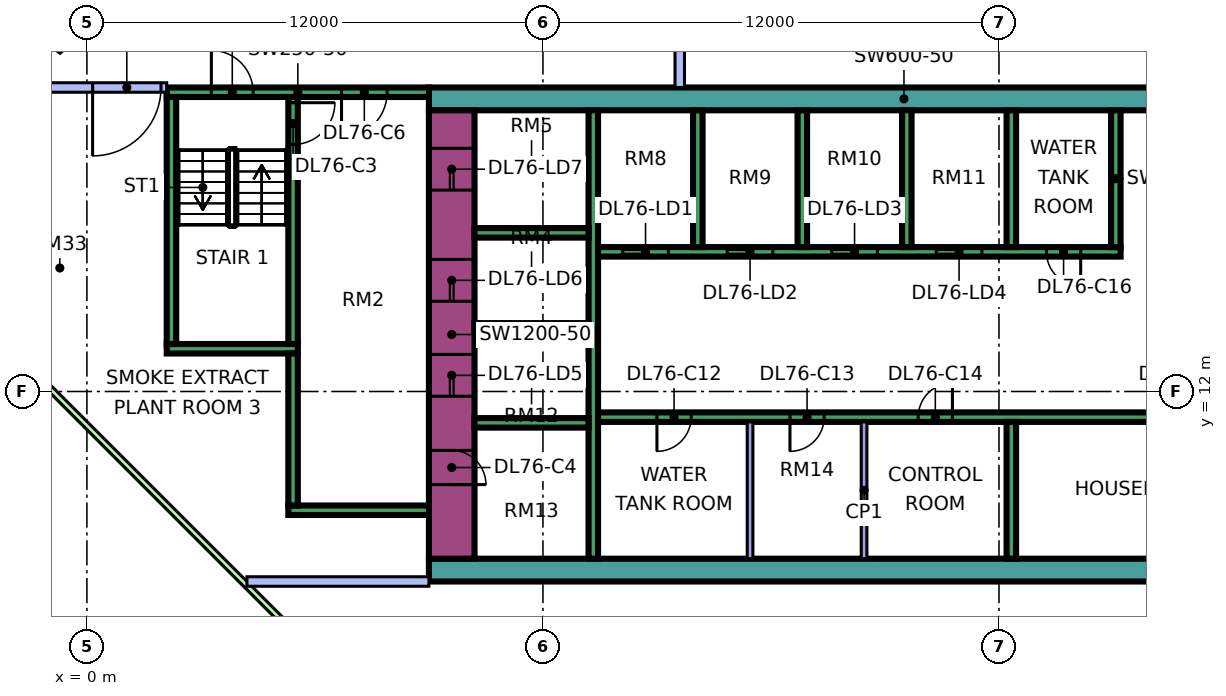
"""IFC4 building model, lengths in metres.
Left out: names, types, materials, properties, quantities, classifications, styles, units other than length and angle.
Written with IfcOpenShell. Run it as: python <this file> out.ifc"""

import sys

from ifc_helpers import new_model, si_unit, direction, frame, frame_2d, origin, place, context, subcontext, project, spatial, rectangle, extrude, element, fill, save


model = new_model("IFC4")
c1 = context("Model", 3, precision=1e-05, world=origin(), true_north=direction((0.0, 1.0)))
c2 = subcontext(c1, "Body", "Model", "MODEL_VIEW")
j1 = project(units=[si_unit("LENGTHUNIT", "METRE"), si_unit("PLANEANGLEUNIT", "RADIAN")], contexts=[c1])
p1 = place(None, origin())
s1 = spatial("IfcSite", under=j1, at=p1, CompositionType="ELEMENT")
p2 = place(p1, origin())
s2 = spatial("IfcBuilding", under=s1, at=p2, CompositionType="ELEMENT")
p3 = place(p2, frame((0.0, 0.0, 322.15)))
s3 = spatial("IfcBuildingStorey", under=s2, at=p3, CompositionType="ELEMENT", Elevation=322.15)
p4 = place(p3, frame((9.0, 7.3, 0.0), z_axis=(0.0, 0.0, 1.0), x_axis=(1.0, 0.0, 0.0)))
e1 = element("IfcWall", 1, at=p4, inside=s3, PredefinedType="SHEAR", context=c2, shape_type="SweptSolid", body=[
    extrude(rectangle(XDim=25.0, YDim=0.6, at=frame_2d((12.5, 0.0))), origin(), (0.0, 0.0, 1.0), 5.5),
])
p5 = place(p3, frame((9.0, 19.7, 0.0), z_axis=(0.0, 0.0, 1.0), x_axis=(1.0, 0.0, 0.0)))
e2 = element("IfcWall", 2, at=p5, inside=s3, PredefinedType="SHEAR", context=c2, shape_type="SweptSolid", body=[
    extrude(rectangle(XDim=25.0, YDim=0.6, at=frame_2d((12.5, 0.0))), origin(), (0.0, 0.0, 1.0), 5.5),
])
p6 = place(p5, frame((19.1, 0.0, 0.0)))
e3 = element("IfcOpeningElement", 3, at=p6, cuts=e2, PredefinedType="OPENING", context=c2, shape_type="SweptSolid", body=[
    extrude(rectangle(XDim=1.8, YDim=2.4, at=frame_2d((0.9, 1.2))), frame((0.0, 0.31, 0.0), z_axis=(0.0, -1.0, 0.0), x_axis=(1.0, 0.0, 0.0)), (0.0, 0.0, 1.0), 0.62),
])
p7 = place(p3, frame((9.6, 7.6, 0.0), z_axis=(0.0, 0.0, 1.0), x_axis=(0.0, 1.0, 0.0)))
e4 = element("IfcWall", 4, at=p7, inside=s3, PredefinedType="SHEAR", context=c2, shape_type="SweptSolid", body=[
    extrude(rectangle(XDim=11.8, YDim=1.2, at=frame_2d((5.9, 0.0))), origin(), (0.0, 0.0, 1.0), 5.5),
])
p8 = place(p7, frame((4.275, 0.0, 0.0)))
e5 = element("IfcOpeningElement", 5, at=p8, cuts=e4, PredefinedType="OPENING", context=c2, shape_type="SweptSolid", body=[
    extrude(rectangle(XDim=1.1, YDim=2.2, at=frame_2d((0.55, 1.1))), frame((0.0, 0.61, 0.0), z_axis=(0.0, -1.0, 0.0), x_axis=(1.0, 0.0, 0.0)), (0.0, 0.0, 1.0), 1.22),
])
p9 = place(p7, frame((6.775, 0.0, 0.0)))
e6 = element("IfcOpeningElement", 6, at=p9, cuts=e4, PredefinedType="OPENING", context=c2, shape_type="SweptSolid", body=[
    extrude(rectangle(XDim=1.1, YDim=2.2, at=frame_2d((0.55, 1.1))), frame((0.0, 0.61, 0.0), z_axis=(0.0, -1.0, 0.0), x_axis=(1.0, 0.0, 0.0)), (0.0, 0.0, 1.0), 1.22),
])
p10 = place(p7, frame((9.7, 0.0, 0.0)))
e7 = element("IfcOpeningElement", 7, at=p10, cuts=e4, PredefinedType="OPENING", context=c2, shape_type="SweptSolid", body=[
    extrude(rectangle(XDim=1.1, YDim=2.2, at=frame_2d((0.55, 1.1))), frame((0.0, 0.61, 0.0), z_axis=(0.0, -1.0, 0.0), x_axis=(1.0, 0.0, 0.0)), (0.0, 0.0, 1.0), 1.22),
])
p11 = place(p7, frame((1.95, 0.0, 0.0)))
e8 = element("IfcOpeningElement", 8, at=p11, cuts=e4, PredefinedType="OPENING", context=c2, shape_type="SweptSolid", body=[
    extrude(rectangle(XDim=0.9, YDim=2.1, at=frame_2d((0.45, 1.05))), frame((0.0, 0.61, 0.0), z_axis=(0.0, -1.0, 0.0), x_axis=(1.0, 0.0, 0.0)), (0.0, 0.0, 1.0), 1.22),
])
p12 = place(p3, frame((13.325, 7.6, 0.0), z_axis=(0.0, 0.0, 1.0), x_axis=(0.0, 1.0, 0.0)))
e9 = element("IfcWall", 9, at=p12, inside=s3, PredefinedType="SHEAR", context=c2, shape_type="SweptSolid", body=[
    extrude(rectangle(XDim=11.8, YDim=0.25, at=frame_2d((5.9, 0.0))), origin(), (0.0, 0.0, 1.0), 5.5),
])
p13 = place(p3, frame((13.45, 11.325, 0.0), z_axis=(0.0, 0.0, 1.0), x_axis=(1.0, 0.0, 0.0)))
e10 = element("IfcWall", 10, at=p13, inside=s3, PredefinedType="SHEAR", context=c2, shape_type="SweptSolid", body=[
    extrude(rectangle(XDim=19.95, YDim=0.25, at=frame_2d((9.975, 0.0))), origin(), (0.0, 0.0, 1.0), 5.5),
])
p14 = place(p13, frame((1.55, 0.0, 0.0)))
e11 = element("IfcOpeningElement", 11, at=p14, cuts=e10, PredefinedType="OPENING", context=c2, shape_type="SweptSolid", body=[
    extrude(rectangle(XDim=0.9, YDim=2.1, at=frame_2d((0.45, 1.05))), frame((0.0, 0.135, 0.0), z_axis=(0.0, -1.0, 0.0), x_axis=(1.0, 0.0, 0.0)), (0.0, 0.0, 1.0), 0.27),
])
p15 = place(p13, frame((5.05, 0.0, 0.0)))
e12 = element("IfcOpeningElement", 12, at=p15, cuts=e10, PredefinedType="OPENING", context=c2, shape_type="SweptSolid", body=[
    extrude(rectangle(XDim=0.9, YDim=2.1, at=frame_2d((0.45, 1.05))), frame((0.0, 0.135, 0.0), z_axis=(0.0, -1.0, 0.0), x_axis=(1.0, 0.0, 0.0)), (0.0, 0.0, 1.0), 0.27),
])
p16 = place(p13, frame((8.425, 0.0, 0.0)))
e13 = element("IfcOpeningElement", 13, at=p16, cuts=e10, PredefinedType="OPENING", context=c2, shape_type="SweptSolid", body=[
    extrude(rectangle(XDim=0.9, YDim=2.1, at=frame_2d((0.45, 1.05))), frame((0.0, 0.135, 0.0), z_axis=(0.0, -1.0, 0.0), x_axis=(1.0, 0.0, 0.0)), (0.0, 0.0, 1.0), 0.27),
])
p17 = place(p13, frame((15.025, 0.0, 0.0)))
e14 = element("IfcOpeningElement", 14, at=p17, cuts=e10, PredefinedType="OPENING", context=c2, shape_type="SweptSolid", body=[
    extrude(rectangle(XDim=0.9, YDim=2.1, at=frame_2d((0.45, 1.05))), frame((0.0, 0.135, 0.0), z_axis=(0.0, -1.0, 0.0), x_axis=(1.0, 0.0, 0.0)), (0.0, 0.0, 1.0), 0.27),
])
p18 = place(p3, frame((13.45, 15.675, 0.0), z_axis=(0.0, 0.0, 1.0), x_axis=(1.0, 0.0, 0.0)))
e15 = element("IfcWall", 15, at=p18, inside=s3, PredefinedType="SHEAR", context=c2, shape_type="SweptSolid", body=[
    extrude(rectangle(XDim=13.75, YDim=0.25, at=frame_2d((6.875, 0.0))), origin(), (0.0, 0.0, 1.0), 5.5),
])
p19 = place(p18, frame((0.65, 0.0, 0.0)))
e16 = element("IfcOpeningElement", 16, at=p19, cuts=e15, PredefinedType="OPENING", context=c2, shape_type="SweptSolid", body=[
    extrude(rectangle(XDim=1.2, YDim=2.2, at=frame_2d((0.6, 1.1))), frame((0.0, 0.135, 0.0), z_axis=(0.0, -1.0, 0.0), x_axis=(1.0, 0.0, 0.0)), (0.0, 0.0, 1.0), 0.27),
])
p20 = place(p18, frame((3.4, 0.0, 0.0)))
e17 = element("IfcOpeningElement", 17, at=p20, cuts=e15, PredefinedType="OPENING", context=c2, shape_type="SweptSolid", body=[
    extrude(rectangle(XDim=1.2, YDim=2.2, at=frame_2d((0.6, 1.1))), frame((0.0, 0.135, 0.0), z_axis=(0.0, -1.0, 0.0), x_axis=(1.0, 0.0, 0.0)), (0.0, 0.0, 1.0), 0.27),
])
p21 = place(p18, frame((6.15, 0.0, 0.0)))
e18 = element("IfcOpeningElement", 18, at=p21, cuts=e15, PredefinedType="OPENING", context=c2, shape_type="SweptSolid", body=[
    extrude(rectangle(XDim=1.2, YDim=2.2, at=frame_2d((0.6, 1.1))), frame((0.0, 0.135, 0.0), z_axis=(0.0, -1.0, 0.0), x_axis=(1.0, 0.0, 0.0)), (0.0, 0.0, 1.0), 0.27),
])
p22 = place(p18, frame((8.9, 0.0, 0.0)))
e19 = element("IfcOpeningElement", 19, at=p22, cuts=e15, PredefinedType="OPENING", context=c2, shape_type="SweptSolid", body=[
    extrude(rectangle(XDim=1.2, YDim=2.2, at=frame_2d((0.6, 1.1))), frame((0.0, 0.135, 0.0), z_axis=(0.0, -1.0, 0.0), x_axis=(1.0, 0.0, 0.0)), (0.0, 0.0, 1.0), 0.27),
])
p23 = place(p18, frame((11.8, 0.0, 0.0)))
e20 = element("IfcOpeningElement", 20, at=p23, cuts=e15, PredefinedType="OPENING", context=c2, shape_type="SweptSolid", body=[
    extrude(rectangle(XDim=0.9, YDim=2.1, at=frame_2d((0.45, 1.05))), frame((0.0, 0.135, 0.0), z_axis=(0.0, -1.0, 0.0), x_axis=(1.0, 0.0, 0.0)), (0.0, 0.0, 1.0), 0.27),
])
for number, where, z_axis, x_axis in (
    (21, (10.2, 11.175, 0.0), (0.0, 0.0, 1.0), (1.0, 0.0, 0.0)),
    (22, (10.2, 13.675, 0.0), (0.0, 0.0, 1.0), (1.0, 0.0, 0.0)),
    (23, (10.2, 16.175, 0.0), (0.0, 0.0, 1.0), (1.0, 0.0, 0.0)),
):
    element("IfcWall", number, at=place(p3, frame(where, z_axis=z_axis, x_axis=x_axis)), inside=s3, PredefinedType="SHEAR", context=c2, shape_type="SweptSolid", body=[
        extrude(rectangle(XDim=3.0, YDim=0.25, at=frame_2d((1.5, 0.0))), origin(), (0.0, 0.0, 1.0), 5.5),
    ])
for number, where, z_axis, x_axis in (
    (24, (24.325, 7.6, 0.0), (0.0, 0.0, 1.0), (0.0, 1.0, 0.0)),
    (25, (16.075, 15.8, 0.0), (0.0, 0.0, 1.0), (0.0, 1.0, 0.0)),
    (26, (18.825, 15.8, 0.0), (0.0, 0.0, 1.0), (0.0, 1.0, 0.0)),
    (27, (21.575, 15.8, 0.0), (0.0, 0.0, 1.0), (0.0, 1.0, 0.0)),
    (28, (24.325, 15.8, 0.0), (0.0, 0.0, 1.0), (0.0, 1.0, 0.0)),
    (29, (27.075, 15.8, 0.0), (0.0, 0.0, 1.0), (0.0, 1.0, 0.0)),
):
    element("IfcWall", number, at=place(p3, frame(where, z_axis=z_axis, x_axis=x_axis)), inside=s3, PredefinedType="SHEAR", context=c2, shape_type="SweptSolid", body=[
        extrude(rectangle(XDim=3.6, YDim=0.25, at=frame_2d((1.8, 0.0))), origin(), (0.0, 0.0, 1.0), 5.5),
    ])
p24 = place(p3, frame((2.1, 19.875, 0.0), z_axis=(0.0, 0.0, 1.0), x_axis=(1.0, 0.0, 0.0)))
e30 = element("IfcWall", 30, at=p24, inside=s3, PredefinedType="SHEAR", context=c2, shape_type="SweptSolid", body=[
    extrude(rectangle(XDim=6.9, YDim=0.25, at=frame_2d((3.45, 0.0))), origin(), (0.0, 0.0, 1.0), 5.5),
])
p25 = place(p24, frame((1.175, 0.0, 0.0)))
e31 = element("IfcOpeningElement", 31, at=p25, cuts=e30, PredefinedType="OPENING", context=c2, shape_type="SweptSolid", body=[
    extrude(rectangle(XDim=1.1, YDim=2.2, at=frame_2d((0.55, 1.1))), frame((0.0, 0.135, 0.0), z_axis=(0.0, -1.0, 0.0), x_axis=(1.0, 0.0, 0.0)), (0.0, 0.0, 1.0), 0.27),
])
p26 = place(p24, frame((4.6, 0.0, 0.0)))
e32 = element("IfcOpeningElement", 32, at=p26, cuts=e30, PredefinedType="OPENING", context=c2, shape_type="SweptSolid", body=[
    extrude(rectangle(XDim=1.2, YDim=2.2, at=frame_2d((0.6, 1.1))), frame((0.0, 0.135, 0.0), z_axis=(0.0, -1.0, 0.0), x_axis=(1.0, 0.0, 0.0)), (0.0, 0.0, 1.0), 0.27),
])
p27 = place(p3, frame((2.1, 13.125, 0.0), z_axis=(0.0, 0.0, 1.0), x_axis=(1.0, 0.0, 0.0)))
e33 = element("IfcWall", 33, at=p27, inside=s3, PredefinedType="SHEAR", context=c2, shape_type="SweptSolid", body=[
    extrude(rectangle(XDim=3.45, YDim=0.25, at=frame_2d((1.725, 0.0))), origin(), (0.0, 0.0, 1.0), 5.5),
])
p28 = place(p3, frame((2.225, 13.25, 0.0), z_axis=(0.0, 0.0, 1.0), x_axis=(0.0, 1.0, 0.0)))
e34 = element("IfcWall", 34, at=p28, inside=s3, PredefinedType="SHEAR", context=c2, shape_type="SweptSolid", body=[
    extrude(rectangle(XDim=6.5, YDim=0.25, at=frame_2d((3.25, 0.0))), origin(), (0.0, 0.0, 1.0), 5.5),
])
p29 = place(p3, frame((5.425, 13.25, 0.0), z_axis=(0.0, 0.0, 1.0), x_axis=(0.0, 1.0, 0.0)))
e35 = element("IfcWall", 35, at=p29, inside=s3, PredefinedType="SHEAR", context=c2, shape_type="SweptSolid", body=[
    extrude(rectangle(XDim=6.5, YDim=0.25, at=frame_2d((3.25, 0.0))), origin(), (0.0, 0.0, 1.0), 5.5),
])
p30 = place(p29, frame((5.25, 0.0, 0.0)))
e36 = element("IfcOpeningElement", 36, at=p30, cuts=e35, PredefinedType="OPENING", context=c2, shape_type="SweptSolid", body=[
    extrude(rectangle(XDim=1.1, YDim=2.2, at=frame_2d((0.55, 1.1))), frame((0.0, 0.135, 0.0), z_axis=(0.0, -1.0, 0.0), x_axis=(1.0, 0.0, 0.0)), (0.0, 0.0, 1.0), 0.27),
])
p31 = place(p3, frame((5.3, 8.875, 0.0), z_axis=(0.0, 0.0, 1.0), x_axis=(1.0, 0.0, 0.0)))
e37 = element("IfcWall", 37, at=p31, inside=s3, PredefinedType="SHEAR", context=c2, shape_type="SweptSolid", body=[
    extrude(rectangle(XDim=3.7, YDim=0.25, at=frame_2d((1.85, 0.0))), origin(), (0.0, 0.0, 1.0), 5.5),
])
p32 = place(p3, frame((5.425, 9.0, 0.0), z_axis=(0.0, 0.0, 1.0), x_axis=(0.0, 1.0, 0.0)))
e38 = element("IfcWall", 38, at=p32, inside=s3, PredefinedType="SHEAR", context=c2, shape_type="SweptSolid", body=[
    extrude(rectangle(XDim=4.0, YDim=0.25, at=frame_2d((2.0, 0.0))), origin(), (0.0, 0.0, 1.0), 5.5),
])
p33 = place(p3, frame((-1.447, 12.553, 0.0), z_axis=(0.0, 0.0, 1.0), x_axis=(0.707106781187, -0.707106781187, 0.0)))
e39 = element("IfcWall", 39, at=p33, inside=s3, PredefinedType="SOLIDWALL", context=c2, shape_type="SweptSolid", body=[
    extrude(rectangle(XDim=19.799, YDim=0.15, at=frame_2d((9.899, 0.0))), origin(), (0.0, 0.0, 1.0), 5.05),
])
p34 = place(p33, frame((11.453, 0.0, 0.45)))
e40 = element("IfcOpeningElement", 40, at=p34, cuts=e39, PredefinedType="OPENING", context=c2, shape_type="SweptSolid", body=[
    extrude(rectangle(XDim=3.0, YDim=3.6, at=frame_2d((1.5, 1.8))), frame((0.0, 0.085, 0.0), z_axis=(0.0, -1.0, 0.0), x_axis=(1.0, 0.0, 0.0)), (0.0, 0.0, 1.0), 0.17),
])
for number, where, z_axis, x_axis in (
    (41, (17.45, 7.6, 0.0), (0.0, 0.0, 1.0), (0.0, 1.0, 0.0)),
    (42, (20.45, 7.6, 0.0), (0.0, 0.0, 1.0), (0.0, 1.0, 0.0)),
):
    element("IfcWall", number, at=place(p3, frame(where, z_axis=z_axis, x_axis=x_axis)), inside=s3, PredefinedType="PARTITIONING", context=c2, shape_type="SweptSolid", body=[
        extrude(rectangle(XDim=3.6, YDim=0.15, at=frame_2d((1.8, 0.0))), origin(), (0.0, 0.0, 1.0), 5.05),
    ])
p35 = place(p3, frame((-1.35, 20.0, 0.0), z_axis=(0.0, 0.0, 1.0), x_axis=(1.0, 0.0, 0.0)))
e43 = element("IfcWall", 43, at=p35, inside=s3, PredefinedType="PARTITIONING", context=c2, shape_type="SweptSolid", body=[
    extrude(rectangle(XDim=3.45, YDim=0.25, at=frame_2d((1.725, 0.0))), origin(), (0.0, 0.0, 1.0), 5.05),
])
p36 = place(p35, frame((1.5, 0.0, 0.0)))
e44 = element("IfcOpeningElement", 44, at=p36, cuts=e43, PredefinedType="OPENING", context=c2, shape_type="SweptSolid", body=[
    extrude(rectangle(XDim=1.8, YDim=2.1, at=frame_2d((0.9, 1.05))), frame((0.0, 0.135, 0.0), z_axis=(0.0, -1.0, 0.0), x_axis=(1.0, 0.0, 0.0)), (0.0, 0.0, 1.0), 0.27),
])
p37 = place(p3, frame((4.211, 7.0, 0.0), z_axis=(0.0, 0.0, 1.0), x_axis=(1.0, 0.0, 0.0)))
e45 = element("IfcWall", 45, at=p37, inside=s3, PredefinedType="PARTITIONING", context=c2, shape_type="SweptSolid", body=[
    extrude(rectangle(XDim=4.789, YDim=0.25, at=frame_2d((2.395, 0.0))), origin(), (0.0, 0.0, 1.0), 5.05),
])
p38 = place(p3, frame((15.6, 20.0, 0.0), z_axis=(0.0, 0.0, 1.0), x_axis=(0.0, 1.0, 0.0)))
e46 = element("IfcWall", 46, at=p38, inside=s3, PredefinedType="PARTITIONING", context=c2, shape_type="SweptSolid", body=[
    extrude(rectangle(XDim=27.775, YDim=0.25, at=frame_2d((13.887, 0.0))), origin(), (0.0, 0.0, 1.0), 5.05),
])
p39 = place(p38, frame((18.15, 0.0, 0.0)))
e47 = element("IfcOpeningElement", 47, at=p39, cuts=e46, PredefinedType="OPENING", context=c2, shape_type="SweptSolid", body=[
    extrude(rectangle(XDim=1.8, YDim=2.1, at=frame_2d((0.9, 1.05))), frame((0.0, 0.135, 0.0), z_axis=(0.0, -1.0, 0.0), x_axis=(1.0, 0.0, 0.0)), (0.0, 0.0, 1.0), 0.27),
])
p40 = place(p38, frame((24.4, 0.0, 0.0)))
e48 = element("IfcOpeningElement", 48, at=p40, cuts=e46, PredefinedType="OPENING", context=c2, shape_type="SweptSolid", body=[
    extrude(rectangle(XDim=0.9, YDim=2.1, at=frame_2d((0.45, 1.05))), frame((0.0, 0.135, 0.0), z_axis=(0.0, -1.0, 0.0), x_axis=(1.0, 0.0, 0.0)), (0.0, 0.0, 1.0), 0.27),
])
p41 = place(p38, frame((14.65, 0.0, 0.0)))
e49 = element("IfcOpeningElement", 49, at=p41, cuts=e46, PredefinedType="OPENING", context=c2, shape_type="SweptSolid", body=[
    extrude(rectangle(XDim=0.9, YDim=2.1, at=frame_2d((0.45, 1.05))), frame((0.0, 0.135, 0.0), z_axis=(0.0, -1.0, 0.0), x_axis=(1.0, 0.0, 0.0)), (0.0, 0.0, 1.0), 0.27),
])
p42 = place(p38, frame((11.4, 0.0, 0.0)))
e50 = element("IfcOpeningElement", 50, at=p42, cuts=e46, PredefinedType="OPENING", context=c2, shape_type="SweptSolid", body=[
    extrude(rectangle(XDim=0.9, YDim=2.1, at=frame_2d((0.45, 1.05))), frame((0.0, 0.135, 0.0), z_axis=(0.0, -1.0, 0.0), x_axis=(1.0, 0.0, 0.0)), (0.0, 0.0, 1.0), 0.27),
])
p43 = place(p19, origin())
e51 = element("IfcDoor", 51, at=p43, inside=s3, OperationType="DOUBLE_DOOR_SLIDING", PredefinedType="DOOR", context=c2, shape_type="SweptSolid", body=[
    extrude(rectangle(XDim=1.2, YDim=2.2, at=frame_2d((0.6, 1.1))), frame((0.0, 0.025, 0.0), z_axis=(0.0, -1.0, 0.0), x_axis=(1.0, 0.0, 0.0)), (0.0, 0.0, 1.0), 0.05),
])
fill(e16, e51)
p44 = place(p20, origin())
e52 = element("IfcDoor", 52, at=p44, inside=s3, OperationType="DOUBLE_DOOR_SLIDING", PredefinedType="DOOR", context=c2, shape_type="SweptSolid", body=[
    extrude(rectangle(XDim=1.2, YDim=2.2, at=frame_2d((0.6, 1.1))), frame((0.0, 0.025, 0.0), z_axis=(0.0, -1.0, 0.0), x_axis=(1.0, 0.0, 0.0)), (0.0, 0.0, 1.0), 0.05),
])
fill(e17, e52)
p45 = place(p21, origin())
e53 = element("IfcDoor", 53, at=p45, inside=s3, OperationType="DOUBLE_DOOR_SLIDING", PredefinedType="DOOR", context=c2, shape_type="SweptSolid", body=[
    extrude(rectangle(XDim=1.2, YDim=2.2, at=frame_2d((0.6, 1.1))), frame((0.0, 0.025, 0.0), z_axis=(0.0, -1.0, 0.0), x_axis=(1.0, 0.0, 0.0)), (0.0, 0.0, 1.0), 0.05),
])
fill(e18, e53)
p46 = place(p22, origin())
e54 = element("IfcDoor", 54, at=p46, inside=s3, OperationType="DOUBLE_DOOR_SLIDING", PredefinedType="DOOR", context=c2, shape_type="SweptSolid", body=[
    extrude(rectangle(XDim=1.2, YDim=2.2, at=frame_2d((0.6, 1.1))), frame((0.0, 0.025, 0.0), z_axis=(0.0, -1.0, 0.0), x_axis=(1.0, 0.0, 0.0)), (0.0, 0.0, 1.0), 0.05),
])
fill(e19, e54)
p47 = place(p8, origin())
e55 = element("IfcDoor", 55, at=p47, inside=s3, OperationType="DOUBLE_DOOR_SLIDING", PredefinedType="DOOR", context=c2, shape_type="SweptSolid", body=[
    extrude(rectangle(XDim=1.1, YDim=2.2, at=frame_2d((0.55, 1.1))), frame((0.0, 0.025, 0.0), z_axis=(0.0, -1.0, 0.0), x_axis=(1.0, 0.0, 0.0)), (0.0, 0.0, 1.0), 0.05),
])
fill(e5, e55)
p48 = place(p9, origin())
e56 = element("IfcDoor", 56, at=p48, inside=s3, OperationType="DOUBLE_DOOR_SLIDING", PredefinedType="DOOR", context=c2, shape_type="SweptSolid", body=[
    extrude(rectangle(XDim=1.1, YDim=2.2, at=frame_2d((0.55, 1.1))), frame((0.0, 0.025, 0.0), z_axis=(0.0, -1.0, 0.0), x_axis=(1.0, 0.0, 0.0)), (0.0, 0.0, 1.0), 0.05),
])
fill(e6, e56)
p49 = place(p10, origin())
e57 = element("IfcDoor", 57, at=p49, inside=s3, OperationType="DOUBLE_DOOR_SLIDING", PredefinedType="DOOR", context=c2, shape_type="SweptSolid", body=[
    extrude(rectangle(XDim=1.1, YDim=2.2, at=frame_2d((0.55, 1.1))), frame((0.0, 0.025, 0.0), z_axis=(0.0, -1.0, 0.0), x_axis=(1.0, 0.0, 0.0)), (0.0, 0.0, 1.0), 0.05),
])
fill(e7, e57)
p50 = place(p30, origin())
e58 = element("IfcDoor", 58, at=p50, inside=s3, OperationType="SINGLE_SWING_RIGHT", PredefinedType="DOOR", context=c2, shape_type="SweptSolid", body=[
    extrude(rectangle(XDim=1.1, YDim=2.2, at=frame_2d((0.55, 1.1))), frame((0.0, 0.025, 0.0), z_axis=(0.0, -1.0, 0.0), x_axis=(1.0, 0.0, 0.0)), (0.0, 0.0, 1.0), 0.05),
])
fill(e36, e58)
p51 = place(p11, frame((0.9, 0.0, 0.0), z_axis=(0.0, 0.0, 1.0), x_axis=(-1.0, 0.0, 0.0)))
e59 = element("IfcDoor", 59, at=p51, inside=s3, OperationType="SINGLE_SWING_LEFT", PredefinedType="DOOR", context=c2, shape_type="SweptSolid", body=[
    extrude(rectangle(XDim=0.9, YDim=2.1, at=frame_2d((0.45, 1.05))), frame((0.0, 0.025, 0.0), z_axis=(0.0, -1.0, 0.0), x_axis=(1.0, 0.0, 0.0)), (0.0, 0.0, 1.0), 0.05),
])
fill(e8, e59)
p52 = place(p25, origin())
e60 = element("IfcDoor", 60, at=p52, inside=s3, OperationType="SINGLE_SWING_LEFT", PredefinedType="DOOR", context=c2, shape_type="SweptSolid", body=[
    extrude(rectangle(XDim=1.1, YDim=2.2, at=frame_2d((0.55, 1.1))), frame((0.0, 0.025, 0.0), z_axis=(0.0, -1.0, 0.0), x_axis=(1.0, 0.0, 0.0)), (0.0, 0.0, 1.0), 0.05),
])
fill(e31, e60)
p53 = place(p26, frame((1.2, 0.0, 0.0), z_axis=(0.0, 0.0, 1.0), x_axis=(-1.0, 0.0, 0.0)))
e61 = element("IfcDoor", 61, at=p53, inside=s3, OperationType="SINGLE_SWING_LEFT", PredefinedType="DOOR", context=c2, shape_type="SweptSolid", body=[
    extrude(rectangle(XDim=1.2, YDim=2.2, at=frame_2d((0.6, 1.1))), frame((0.0, 0.025, 0.0), z_axis=(0.0, -1.0, 0.0), x_axis=(1.0, 0.0, 0.0)), (0.0, 0.0, 1.0), 0.05),
])
fill(e32, e61)
p54 = place(p14, frame((0.9, 0.0, 0.0), z_axis=(0.0, 0.0, 1.0), x_axis=(-1.0, 0.0, 0.0)))
e62 = element("IfcDoor", 62, at=p54, inside=s3, OperationType="SINGLE_SWING_LEFT", PredefinedType="DOOR", context=c2, shape_type="SweptSolid", body=[
    extrude(rectangle(XDim=0.9, YDim=2.1, at=frame_2d((0.45, 1.05))), frame((0.0, 0.025, 0.0), z_axis=(0.0, -1.0, 0.0), x_axis=(1.0, 0.0, 0.0)), (0.0, 0.0, 1.0), 0.05),
])
fill(e11, e62)
p55 = place(p15, frame((0.9, 0.0, 0.0), z_axis=(0.0, 0.0, 1.0), x_axis=(-1.0, 0.0, 0.0)))
e63 = element("IfcDoor", 63, at=p55, inside=s3, OperationType="SINGLE_SWING_LEFT", PredefinedType="DOOR", context=c2, shape_type="SweptSolid", body=[
    extrude(rectangle(XDim=0.9, YDim=2.1, at=frame_2d((0.45, 1.05))), frame((0.0, 0.025, 0.0), z_axis=(0.0, -1.0, 0.0), x_axis=(1.0, 0.0, 0.0)), (0.0, 0.0, 1.0), 0.05),
])
fill(e12, e63)
p56 = place(p16, frame((0.9, 0.0, 0.0), z_axis=(0.0, 0.0, 1.0), x_axis=(-1.0, 0.0, 0.0)))
e64 = element("IfcDoor", 64, at=p56, inside=s3, OperationType="SINGLE_SWING_RIGHT", PredefinedType="DOOR", context=c2, shape_type="SweptSolid", body=[
    extrude(rectangle(XDim=0.9, YDim=2.1, at=frame_2d((0.45, 1.05))), frame((0.0, 0.025, 0.0), z_axis=(0.0, -1.0, 0.0), x_axis=(1.0, 0.0, 0.0)), (0.0, 0.0, 1.0), 0.05),
])
fill(e13, e64)
p57 = place(p23, origin())
e65 = element("IfcDoor", 65, at=p57, inside=s3, OperationType="SINGLE_SWING_RIGHT", PredefinedType="DOOR", context=c2, shape_type="SweptSolid", body=[
    extrude(rectangle(XDim=0.9, YDim=2.1, at=frame_2d((0.45, 1.05))), frame((0.0, 0.025, 0.0), z_axis=(0.0, -1.0, 0.0), x_axis=(1.0, 0.0, 0.0)), (0.0, 0.0, 1.0), 0.05),
])
fill(e20, e65)
p58 = place(p36, frame((1.8, 0.0, 0.0), z_axis=(0.0, 0.0, 1.0), x_axis=(-1.0, 0.0, 0.0)))
e66 = element("IfcDoor", 66, at=p58, inside=s3, OperationType="DOUBLE_DOOR_SINGLE_SWING", PredefinedType="DOOR", context=c2, shape_type="SweptSolid", body=[
    extrude(rectangle(XDim=1.8, YDim=2.1, at=frame_2d((0.9, 1.05))), frame((0.0, 0.025, 0.0), z_axis=(0.0, -1.0, 0.0), x_axis=(1.0, 0.0, 0.0)), (0.0, 0.0, 1.0), 0.05),
])
fill(e44, e66)
save(model, sys.argv[1])
